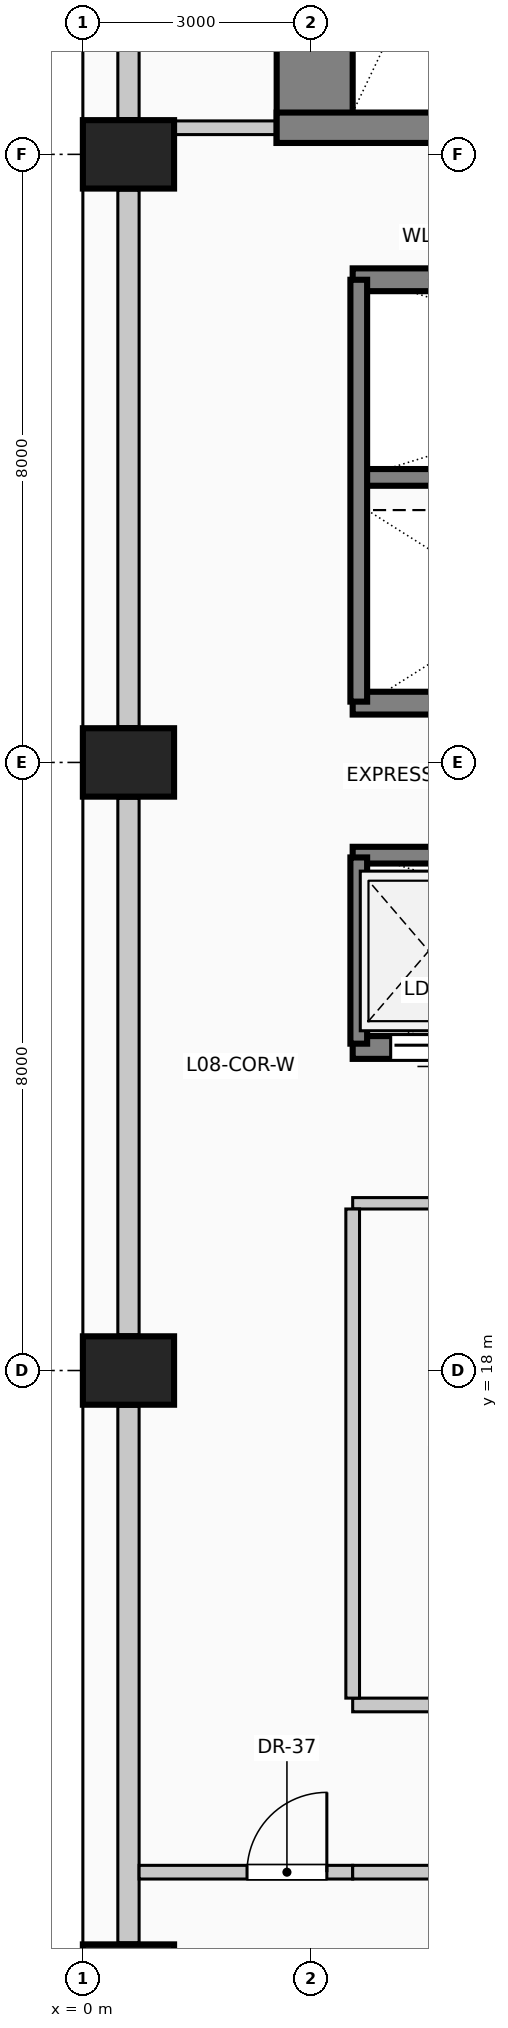
"""IFC4 building model, lengths in metres.
Left out: names, types, materials, properties, quantities, classifications, styles, units other than length and angle.
Written with IfcOpenShell. Run it as: python <this file> out.ifc"""

import sys

from ifc_helpers import new_model, si_unit, direction, frame, frame_2d, origin, origin_2d, place, context, subcontext, project, spatial, rectangle, extrude, element, fill, save


model = new_model("IFC4")
c1 = context("Model", 3, precision=1e-05, world=origin(), true_north=direction((0.0, 1.0)))
c2 = subcontext(c1, "Body", "Model", "MODEL_VIEW")
j1 = project(units=[si_unit("LENGTHUNIT", "METRE"), si_unit("PLANEANGLEUNIT", "RADIAN")], contexts=[c1])
p1 = place(None, origin())
s1 = spatial("IfcSite", under=j1, at=p1, CompositionType="ELEMENT")
p2 = place(p1, origin())
s2 = spatial("IfcBuilding", under=s1, at=p2, CompositionType="ELEMENT")
p3 = place(p2, frame((0.0, 0.0, 34.6)))
s3 = spatial("IfcBuildingStorey", under=s2, at=p3, CompositionType="ELEMENT", Elevation=34.6)
p4 = place(p3, frame((3.05, 34.15, 0.0), z_axis=(0.0, 0.0, 1.0), x_axis=(0.0, 1.0, 0.0)))
e1 = element("IfcWall", 1, at=p4, inside=s3, PredefinedType="SHEAR", context=c2, shape_type="SweptSolid", body=[
    extrude(rectangle(XDim=9.28, YDim=1.0, at=frame_2d((4.64, 0.0))), origin(), (0.0, 0.0, 1.0), 4.0),
])
p5 = place(p3, frame((2.55, 34.35, 0.0), z_axis=(0.0, 0.0, 1.0), x_axis=(1.0, 0.0, 0.0)))
e2 = element("IfcWall", 2, at=p5, inside=s3, PredefinedType="SHEAR", context=c2, shape_type="SweptSolid", body=[
    extrude(rectangle(XDim=5.16, YDim=0.4, at=frame_2d((2.58, 0.0))), origin(), (0.0, 0.0, 1.0), 4.0),
])
p6 = place(p5, frame((2.4, 0.0, 0.0)))
e3 = element("IfcOpeningElement", 3, at=p6, cuts=e2, PredefinedType="OPENING", context=c2, shape_type="SweptSolid", body=[
    extrude(rectangle(XDim=1.15, YDim=2.2, at=frame_2d((0.575, 1.1))), frame((0.0, 0.21, 0.0), z_axis=(0.0, -1.0, 0.0), x_axis=(1.0, 0.0, 0.0)), (0.0, 0.0, 1.0), 0.42),
])
for number, where, z_axis, x_axis in (
    (4, (0.6, 10.0, 0.0), (0.0, 0.0, 1.0), (0.0, 1.0, 0.0)),
    (5, (0.6, 18.0, 0.0), (0.0, 0.0, 1.0), (0.0, 1.0, 0.0)),
    (6, (0.6, 26.0, 0.0), (0.0, 0.0, 1.0), (0.0, 1.0, 0.0)),
    (7, (0.6, 34.0, 0.0), (0.0, 0.0, 1.0), (0.0, 1.0, 0.0)),
):
    element("IfcColumn", number, at=place(p3, frame(where, z_axis=z_axis, x_axis=x_axis)), inside=s3, PredefinedType="COLUMN", context=c2, shape_type="SweptSolid", body=[
        extrude(rectangle(XDim=0.9, YDim=1.2, at=origin_2d()), origin(), (0.0, 0.0, 1.0), 4.0),
    ])
for number, where, z_axis, x_axis in (
    (8, (0.6, 10.47, 0.0), (0.0, 0.0, 1.0), (0.0, 1.0, 0.0)),
    (9, (0.6, 18.47, 0.0), (0.0, 0.0, 1.0), (0.0, 1.0, 0.0)),
    (10, (0.6, 26.47, 0.0), (0.0, 0.0, 1.0), (0.0, 1.0, 0.0)),
):
    element("IfcWall", number, at=place(p3, frame(where, z_axis=z_axis, x_axis=x_axis)), inside=s3, PredefinedType="SOLIDWALL", context=c2, shape_type="SweptSolid", body=[
        extrude(rectangle(XDim=7.06, YDim=0.28, at=frame_2d((3.53, 0.0))), origin(), (0.0, 0.0, 1.0), 2.85),
    ])
p7 = place(p3, frame((0.6, 34.47, 0.0), z_axis=(0.0, 0.0, 1.0), x_axis=(0.0, 1.0, 0.0)))
e11 = element("IfcWall", 11, at=p7, inside=s3, PredefinedType="SOLIDWALL", context=c2, shape_type="SweptSolid", body=[
    extrude(rectangle(XDim=7.46, YDim=0.28, at=frame_2d((3.73, 0.0))), origin(), (0.0, 0.0, 1.0), 2.85),
])
p8 = place(p3, frame((5.65, 22.25, 0.0), z_axis=(0.0, 0.0, 1.0), x_axis=(-1.0, 0.0, 0.0)))
e12 = element("IfcWall", 12, at=p8, inside=s3, PredefinedType="SOLIDWALL", context=c2, shape_type="SweptSolid", body=[
    extrude(rectangle(XDim=2.1, YDim=0.3, at=frame_2d((1.05, 0.0))), origin(), (0.0, 0.0, 1.0), 4.0),
])
p9 = place(p8, frame((0.5, 0.0, 0.0)))
e13 = element("IfcOpeningElement", 13, at=p9, cuts=e12, PredefinedType="OPENING", context=c2, shape_type="SweptSolid", body=[
    extrude(rectangle(XDim=1.1, YDim=2.2, at=frame_2d((0.55, 1.1))), frame((0.0, 0.16, 0.0), z_axis=(0.0, -1.0, 0.0), x_axis=(1.0, 0.0, 0.0)), (0.0, 0.0, 1.0), 0.32),
])
for number, where, z_axis, x_axis in (
    (14, (3.55, 32.35, 0.0), (0.0, 0.0, 1.0), (1.0, 0.0, 0.0)),
    (15, (5.65, 26.78, 0.0), (0.0, 0.0, 1.0), (-1.0, 0.0, 0.0)),
):
    element("IfcWall", number, at=place(p3, frame(where, z_axis=z_axis, x_axis=x_axis)), inside=s3, PredefinedType="SOLIDWALL", context=c2, shape_type="SweptSolid", body=[
        extrude(rectangle(XDim=2.1, YDim=0.3, at=frame_2d((1.05, 0.0))), origin(), (0.0, 0.0, 1.0), 4.0),
    ])
p10 = place(p3, frame((3.55, 29.75, 0.0), z_axis=(0.0, 0.0, 1.0), x_axis=(1.0, 0.0, 0.0)))
e16 = element("IfcWall", 16, at=p10, inside=s3, PredefinedType="SOLIDWALL", context=c2, shape_type="SweptSolid", body=[
    extrude(rectangle(XDim=8.65, YDim=0.22, at=frame_2d((4.325, 0.0))), origin(), (0.0, 0.0, 1.0), 4.0),
])
p11 = place(p3, frame((3.63, 26.8, 0.0), z_axis=(0.0, 0.0, 1.0), x_axis=(0.0, 1.0, 0.0)))
e17 = element("IfcWall", 17, at=p11, inside=s3, PredefinedType="SOLIDWALL", context=c2, shape_type="SweptSolid", body=[
    extrude(rectangle(XDim=5.55, YDim=0.22, at=frame_2d((2.775, 0.0))), origin(), (0.0, 0.0, 1.0), 4.0),
])
p12 = place(p3, frame((3.55, 24.78, 0.0), z_axis=(0.0, 0.0, 1.0), x_axis=(1.0, 0.0, 0.0)))
e18 = element("IfcWall", 18, at=p12, inside=s3, PredefinedType="SOLIDWALL", context=c2, shape_type="SweptSolid", body=[
    extrude(rectangle(XDim=8.65, YDim=0.22, at=frame_2d((4.325, 0.0))), origin(), (0.0, 0.0, 1.0), 4.0),
])
p13 = place(p3, frame((3.63, 22.3, 0.0), z_axis=(0.0, 0.0, 1.0), x_axis=(0.0, 1.0, 0.0)))
e19 = element("IfcWall", 19, at=p13, inside=s3, PredefinedType="SOLIDWALL", context=c2, shape_type="SweptSolid", body=[
    extrude(rectangle(XDim=2.45, YDim=0.22, at=frame_2d((1.225, 0.0))), origin(), (0.0, 0.0, 1.0), 4.0),
])
p14 = place(p3, frame((0.74, 11.4, 0.0), z_axis=(0.0, 0.0, 1.0), x_axis=(1.0, 0.0, 0.0)))
e20 = element("IfcWall", 20, at=p14, inside=s3, PredefinedType="PARTITIONING", context=c2, shape_type="SweptSolid", body=[
    extrude(rectangle(XDim=2.81, YDim=0.18, at=frame_2d((1.405, 0.0))), origin(), (0.0, 0.0, 1.0), 3.095),
])
p15 = place(p14, frame((1.42, 0.0, 0.0)))
e21 = element("IfcOpeningElement", 21, at=p15, cuts=e20, PredefinedType="OPENING", context=c2, shape_type="SweptSolid", body=[
    extrude(rectangle(XDim=1.05, YDim=2.15, at=frame_2d((0.525, 1.075))), frame((0.0, 0.1, 0.0), z_axis=(0.0, -1.0, 0.0), x_axis=(1.0, 0.0, 0.0)), (0.0, 0.0, 1.0), 0.2),
])
p16 = place(p3, frame((3.55, 11.4, 0.0), z_axis=(0.0, 0.0, 1.0), x_axis=(1.0, 0.0, 0.0)))
e22 = element("IfcWall", 22, at=p16, inside=s3, PredefinedType="PARTITIONING", context=c2, shape_type="SweptSolid", body=[
    extrude(rectangle(XDim=3.25, YDim=0.18, at=frame_2d((1.625, 0.0))), origin(), (0.0, 0.0, 1.0), 3.095),
])
p17 = place(p3, frame((3.55, 13.6, 0.0), z_axis=(0.0, 0.0, 1.0), x_axis=(1.0, 0.0, 0.0)))
e23 = element("IfcWall", 23, at=p17, inside=s3, PredefinedType="PARTITIONING", context=c2, shape_type="SweptSolid", body=[
    extrude(rectangle(XDim=6.05, YDim=0.18, at=frame_2d((3.025, 0.0))), origin(), (0.0, 0.0, 1.0), 3.7),
])
p18 = place(p17, frame((2.5, 0.0, 0.0)))
e24 = element("IfcOpeningElement", 24, at=p18, cuts=e23, PredefinedType="OPENING", context=c2, shape_type="SweptSolid", body=[
    extrude(rectangle(XDim=1.05, YDim=2.15, at=frame_2d((0.525, 1.075))), frame((0.0, 0.1, 0.0), z_axis=(0.0, -1.0, 0.0), x_axis=(1.0, 0.0, 0.0)), (0.0, 0.0, 1.0), 0.2),
])
p19 = place(p3, frame((3.55, 20.2, 0.0), z_axis=(0.0, 0.0, 1.0), x_axis=(1.0, 0.0, 0.0)))
e25 = element("IfcWall", 25, at=p19, inside=s3, PredefinedType="PARTITIONING", context=c2, shape_type="SweptSolid", body=[
    extrude(rectangle(XDim=6.05, YDim=0.15, at=frame_2d((3.025, 0.0))), origin(), (0.0, 0.0, 1.0), 3.7),
])
p20 = place(p3, frame((1.2, 34.35, 0.0), z_axis=(0.0, 0.0, 1.0), x_axis=(1.0, 0.0, 0.0)))
e26 = element("IfcWall", 26, at=p20, inside=s3, PredefinedType="PARTITIONING", context=c2, shape_type="SweptSolid", body=[
    extrude(rectangle(XDim=1.35, YDim=0.18, at=frame_2d((0.675, 0.0))), origin(), (0.0, 0.0, 1.0), 3.7),
])
p21 = place(p3, frame((3.55, 13.69, 0.0), z_axis=(0.0, 0.0, 1.0), x_axis=(0.0, 1.0, 0.0)))
e27 = element("IfcWall", 27, at=p21, inside=s3, PredefinedType="PARTITIONING", context=c2, shape_type="SweptSolid", body=[
    extrude(rectangle(XDim=6.435, YDim=0.18, at=frame_2d((3.218, 0.0))), origin(), (0.0, 0.0, 1.0), 3.7),
])
p22 = place(p9, origin())
e28 = element("IfcDoor", 28, at=p22, inside=s3, OperationType="SLIDING_TO_LEFT", PredefinedType="DOOR", context=c2, shape_type="SweptSolid", body=[
    extrude(rectangle(XDim=1.1, YDim=2.2, at=frame_2d((0.55, 1.1))), frame((0.0, 0.025, 0.0), z_axis=(0.0, -1.0, 0.0), x_axis=(1.0, 0.0, 0.0)), (0.0, 0.0, 1.0), 0.05),
])
fill(e13, e28)
p23 = place(p15, origin())
e29 = element("IfcDoor", 29, at=p23, inside=s3, OperationType="SINGLE_SWING_RIGHT", PredefinedType="DOOR", context=c2, shape_type="SweptSolid", body=[
    extrude(rectangle(XDim=1.05, YDim=2.15, at=frame_2d((0.525, 1.075))), frame((0.0, 0.025, 0.0), z_axis=(0.0, -1.0, 0.0), x_axis=(1.0, 0.0, 0.0)), (0.0, 0.0, 1.0), 0.05),
])
fill(e21, e29)
save(model, sys.argv[1])
